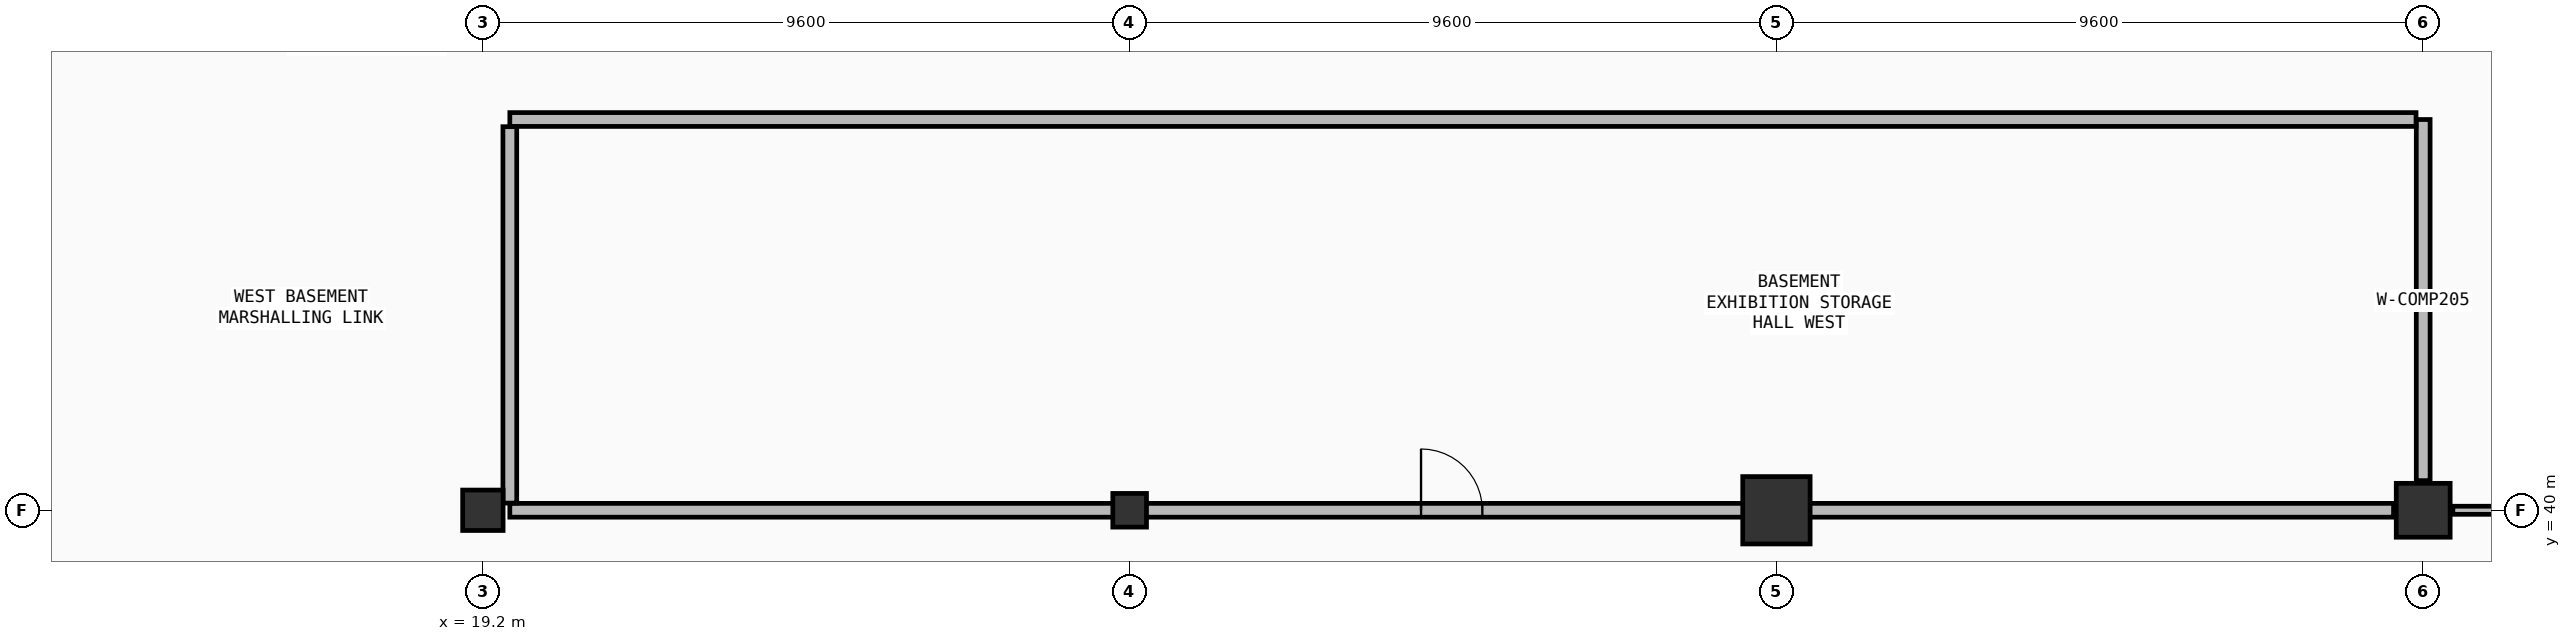
"""IFC4 building model, lengths in metres.
Left out: names, types, materials, properties, quantities, classifications, styles, units other than length and angle.
Written with IfcOpenShell. Run it as: python <this file> out.ifc"""

import sys

from ifc_helpers import new_model, si_unit, direction, frame, frame_2d, origin, origin_2d, place, context, subcontext, project, spatial, rectangle, circle, extrude, element, fill, save


model = new_model("IFC4")
c1 = context("Model", 3, precision=1e-05, world=origin(), true_north=direction((0.0, 1.0)))
c2 = subcontext(c1, "Body", "Model", "MODEL_VIEW")
j1 = project(units=[si_unit("LENGTHUNIT", "METRE"), si_unit("PLANEANGLEUNIT", "RADIAN")], contexts=[c1])
p1 = place(None, origin())
s1 = spatial("IfcSite", under=j1, at=p1, CompositionType="ELEMENT")
p2 = place(p1, origin())
s2 = spatial("IfcBuilding", under=s1, at=p2, CompositionType="ELEMENT")
p3 = place(p2, frame((0.0, 0.0, -5.4)))
s3 = spatial("IfcBuildingStorey", under=s2, at=p3, CompositionType="ELEMENT", Elevation=-5.4)
p4 = place(p3, frame((19.2, 40.0, 0.0), z_axis=(0.0, 0.0, 1.0), x_axis=(1.0, 0.0, 0.0)))
e1 = element("IfcColumn", 1, at=p4, inside=s3, PredefinedType="COLUMN", context=c2, shape_type="SweptSolid", body=[
    extrude(rectangle(XDim=0.6, YDim=0.6, at=origin_2d()), origin(), (0.0, 0.0, 1.0), 5.4),
])
p5 = place(p3, frame((28.8, 40.0, 0.0), z_axis=(0.0, 0.0, 1.0), x_axis=(1.0, 0.0, 0.0)))
e2 = element("IfcColumn", 2, at=p5, inside=s3, PredefinedType="COLUMN", context=c2, shape_type="SweptSolid", body=[
    extrude(rectangle(XDim=0.5, YDim=0.5, at=origin_2d()), origin(), (0.0, 0.0, 1.0), 5.4),
])
p6 = place(p3, frame((38.4, 40.0, 0.0), z_axis=(0.0, 0.0, 1.0), x_axis=(1.0, 0.0, 0.0)))
e3 = element("IfcColumn", 3, at=p6, inside=s3, PredefinedType="COLUMN", context=c2, shape_type="SweptSolid", body=[
    extrude(circle(Radius=0.5, at=origin_2d()), origin(), (0.0, 0.0, 1.0), 5.4),
])
p7 = place(p3, frame((48.0, 40.0, 0.0), z_axis=(0.0, 0.0, 1.0), x_axis=(1.0, 0.0, 0.0)))
e4 = element("IfcColumn", 4, at=p7, inside=s3, PredefinedType="COLUMN", context=c2, shape_type="SweptSolid", body=[
    extrude(circle(Radius=0.4, at=origin_2d()), origin(), (0.0, 0.0, 1.0), 5.4),
])
p8 = place(p3, frame((19.6, 40.0, 0.0), z_axis=(0.0, 0.0, 1.0), x_axis=(1.0, 0.0, 0.0)))
e5 = element("IfcWall", 5, at=p8, inside=s3, PredefinedType="SOLIDWALL", context=c2, shape_type="SweptSolid", body=[
    extrude(rectangle(XDim=27.96, YDim=0.205, at=frame_2d((13.98, 0.0))), origin(), (0.0, 0.0, 1.0), 4.46),
])
p9 = place(p8, frame((13.525, 0.0, 0.0)))
e6 = element("IfcOpeningElement", 6, at=p9, cuts=e5, PredefinedType="OPENING", context=c2, shape_type="SweptSolid", body=[
    extrude(rectangle(XDim=0.91, YDim=2.08, at=frame_2d((0.455, 1.04))), frame((0.0, 0.113, 0.0), z_axis=(0.0, -1.0, 0.0), x_axis=(1.0, 0.0, 0.0)), (0.0, 0.0, 1.0), 0.225),
])
p10 = place(p3, frame((48.0, 40.44, 0.0), z_axis=(0.0, 0.0, 1.0), x_axis=(0.0, 1.0, 0.0)))
e7 = element("IfcWall", 7, at=p10, inside=s3, PredefinedType="SOLIDWALL", context=c2, shape_type="SweptSolid", body=[
    extrude(rectangle(XDim=5.36, YDim=0.205, at=frame_2d((2.68, 0.0))), origin(), (0.0, 0.0, 1.0), 4.54),
])
p11 = place(p3, frame((47.894, 45.8, 0.0), z_axis=(0.0, 0.0, 1.0), x_axis=(-1.0, 0.0, 0.0)))
e8 = element("IfcWall", 8, at=p11, inside=s3, PredefinedType="SOLIDWALL", context=c2, shape_type="SweptSolid", body=[
    extrude(rectangle(XDim=28.293, YDim=0.205, at=frame_2d((14.147, 0.0))), origin(), (0.0, 0.0, 1.0), 4.49),
])
p12 = place(p3, frame((19.6, 45.694, 0.0), z_axis=(0.0, 0.0, 1.0), x_axis=(0.0, -1.0, 0.0)))
e9 = element("IfcWall", 9, at=p12, inside=s3, PredefinedType="SOLIDWALL", context=c2, shape_type="SweptSolid", body=[
    extrude(rectangle(XDim=5.587, YDim=0.205, at=frame_2d((2.793, 0.0))), origin(), (0.0, 0.0, 1.0), 5.09),
])
p13 = place(p3, frame((48.44, 40.0, 0.0), z_axis=(0.0, 0.0, 1.0), x_axis=(1.0, 0.0, 0.0)))
e10 = element("IfcWall", 10, at=p13, inside=s3, PredefinedType="PARTITIONING", context=c2, shape_type="SweptSolid", body=[
    extrude(rectangle(XDim=5.16, YDim=0.12, at=frame_2d((2.58, 0.0))), origin(), (0.0, 0.0, 1.0), 4.56),
])
p14 = place(p13, frame((2.075, 0.0, 0.0)))
e11 = element("IfcOpeningElement", 11, at=p14, cuts=e10, PredefinedType="OPENING", context=c2, shape_type="SweptSolid", body=[
    extrude(rectangle(XDim=1.01, YDim=2.22, at=frame_2d((0.505, 1.11))), frame((0.0, 0.07, 0.0), z_axis=(0.0, -1.0, 0.0), x_axis=(1.0, 0.0, 0.0)), (0.0, 0.0, 1.0), 0.14),
])
p15 = place(p9, origin())
e12 = element("IfcDoor", 12, at=p15, inside=s3, OperationType="SINGLE_SWING_RIGHT", PredefinedType="DOOR", context=c2, shape_type="SweptSolid", body=[
    extrude(rectangle(XDim=0.91, YDim=2.08, at=frame_2d((0.455, 1.04))), frame((0.0, 0.025, 0.0), z_axis=(0.0, -1.0, 0.0), x_axis=(1.0, 0.0, 0.0)), (0.0, 0.0, 1.0), 0.05),
])
fill(e6, e12)
save(model, sys.argv[1])
